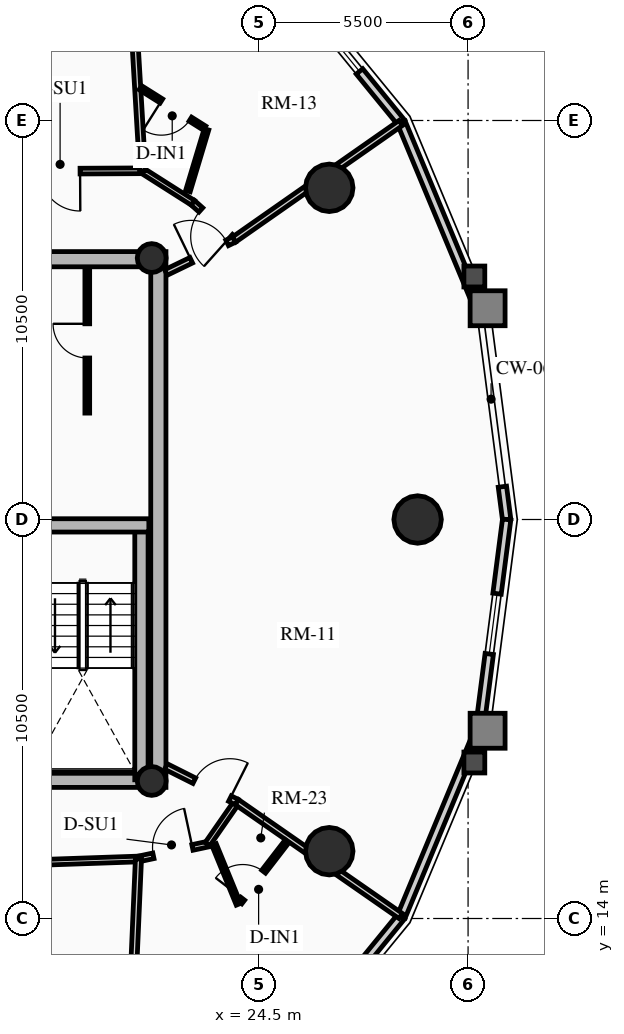
"""IFC4 building model, lengths in metres.
Left out: names, types, materials, properties, quantities, classifications, styles, units other than length and angle.
Written with IfcOpenShell. Run it as: python <this file> out.ifc"""

import sys

from ifc_helpers import new_model, si_unit, direction, frame, frame_2d, origin, origin_2d, place, context, subcontext, project, spatial, rectangle, circle, hollow_circle, extrude, source, transform, mapped, element, fill, save


model = new_model("IFC4")
c1 = context("Model", 3, precision=1e-05, world=origin(), true_north=direction((0.0, 1.0)))
c2 = subcontext(c1, "Body", "Model", "MODEL_VIEW")
j1 = project(units=[si_unit("LENGTHUNIT", "METRE"), si_unit("PLANEANGLEUNIT", "RADIAN")], contexts=[c1])
p1 = place(None, origin())
s1 = spatial("IfcSite", under=j1, at=p1, CompositionType="ELEMENT")
p2 = place(p1, origin())
s2 = spatial("IfcBuilding", under=s1, at=p2, CompositionType="ELEMENT")
p3 = place(p2, frame((0.0, 0.0, 151.6)))
s3 = spatial("IfcBuildingStorey", under=s2, at=p3, CompositionType="ELEMENT", Elevation=151.6)
p4 = place(p3, frame((21.85, 17.45, 0.0), z_axis=(0.0, 0.0, 1.0), x_axis=(0.0, 1.0, 0.0)))
e1 = element("IfcWall", 1, at=p4, inside=s3, PredefinedType="SHEAR", context=c2, shape_type="SweptSolid", body=[
    extrude(rectangle(XDim=14.1, YDim=0.4, at=frame_2d((7.05, 0.0))), origin(), (0.0, 0.0, 1.0), 2.91),
])
p5 = place(p3, frame((11.15, 17.65, 0.0), z_axis=(0.0, 0.0, 1.0), x_axis=(1.0, 0.0, 0.0)))
e2 = element("IfcWall", 2, at=p5, inside=s3, PredefinedType="SHEAR", context=c2, shape_type="SweptSolid", body=[
    extrude(rectangle(XDim=10.7, YDim=0.4, at=frame_2d((5.35, 0.0))), origin(), (0.0, 0.0, 1.0), 2.91),
])
m1 = source(origin(), c2, "Body", "SweptSolid", [
    extrude(rectangle(XDim=1.5, YDim=2.02, at=frame_2d((0.75, 1.01))), frame((0.0, 0.21, 0.0), z_axis=(0.0, -1.0, 0.0), x_axis=(1.0, 0.0, 0.0)), (0.0, 0.0, 1.0), 0.42),
])
p6 = place(p5, frame((5.45, 0.0, 0.0)))
e3 = element("IfcOpeningElement", 3, at=p6, cuts=e2, PredefinedType="OPENING", context=c2, shape_type="MappedRepresentation", body=[
    mapped(m1, transform((0.0, 0.0, 0.0), x_axis=(1.0, 0.0, 0.0), y_axis=(0.0, 1.0, 0.0), z_axis=(0.0, 0.0, 1.0), scale=1.0)),
])
p7 = place(p3, frame((11.15, 31.35, 0.0), z_axis=(0.0, 0.0, 1.0), x_axis=(1.0, 0.0, 0.0)))
e4 = element("IfcWall", 4, at=p7, inside=s3, PredefinedType="SHEAR", context=c2, shape_type="SweptSolid", body=[
    extrude(rectangle(XDim=10.7, YDim=0.4, at=frame_2d((5.35, 0.0))), origin(), (0.0, 0.0, 1.0), 2.91),
])
p8 = place(p7, frame((4.6, 0.0, 0.0)))
e5 = element("IfcOpeningElement", 5, at=p8, cuts=e4, PredefinedType="OPENING", context=c2, shape_type="MappedRepresentation", body=[
    mapped(m1, transform((0.0, 0.0, 0.0), x_axis=(1.0, 0.0, 0.0), y_axis=(0.0, 1.0, 0.0), z_axis=(0.0, 0.0, 1.0), scale=1.0)),
])
p9 = place(p3, frame((21.405, 17.65, 0.0), z_axis=(0.0, 0.0, 1.0), x_axis=(0.0, 1.0, 0.0)))
e6 = element("IfcWall", 6, at=p9, inside=s3, PredefinedType="SHEAR", context=c2, shape_type="SweptSolid", body=[
    extrude(rectangle(XDim=6.695, YDim=0.35, at=frame_2d((3.348, 0.0))), origin(), (0.0, 0.0, 1.0), 2.91),
])
p10 = place(p3, frame((18.315, 24.345, 0.0), z_axis=(0.0, 0.0, 1.0), x_axis=(1.0, 0.0, 0.0)))
e7 = element("IfcWall", 7, at=p10, inside=s3, PredefinedType="SHEAR", context=c2, shape_type="SweptSolid", body=[
    extrude(rectangle(XDim=3.285, YDim=0.35, at=frame_2d((1.643, 0.0))), origin(), (0.0, 0.0, 1.0), 2.91),
])
for number, where, z_axis, x_axis in (
    (8, (21.675, 17.62, 0.0), (0.0, 0.0, 1.0), (1.0, 0.0, 0.0)),
    (9, (21.675, 31.38, 0.0), (0.0, 0.0, 1.0), (1.0, 0.0, 0.0)),
):
    element("IfcColumn", number, at=place(p3, frame(where, z_axis=z_axis, x_axis=x_axis)), inside=s3, PredefinedType="COLUMN", context=c2, shape_type="SweptSolid", body=[
        extrude(hollow_circle(Radius=0.38, WallThickness=0.032, at=origin_2d()), origin(), (0.0, 0.0, 1.0), 2.91),
    ])
for number, where, z_axis, x_axis in (
    (10, (28.672, 24.5, 0.0), (0.0, 0.0, 1.0), (1.0, 0.0, 0.0)),
    (11, (26.347, 33.229, 0.0), (0.0, 0.0, 1.0), (1.0, 0.0, 0.0)),
    (12, (26.347, 15.771, 0.0), (0.0, 0.0, 1.0), (1.0, 0.0, 0.0)),
):
    element("IfcColumn", number, at=place(p3, frame(where, z_axis=z_axis, x_axis=x_axis)), inside=s3, PredefinedType="USERDEFINED", context=c2, shape_type="SweptSolid", body=[
        extrude(circle(Radius=0.625, at=origin_2d()), origin(), (0.0, 0.0, 1.0), 2.91),
    ])
p11 = place(p3, frame((30.903, 25.363, 0.0), z_axis=(0.0, 0.0, 1.0), x_axis=(0.128247365719, -0.991742211054, 0.0)))
e13 = element("IfcWall", 13, at=p11, inside=s3, PredefinedType="SOLIDWALL", context=c2, shape_type="SweptSolid", body=[
    extrude(rectangle(XDim=0.87, YDim=0.22, at=frame_2d((0.435, 0.0))), origin(), (0.0, 0.0, 1.0), 2.675),
])
p12 = place(p3, frame((28.243, 34.945, 0.0), z_axis=(0.0, 0.0, 1.0), x_axis=(0.384259959969, -0.923224936386, 0.0)))
e14 = element("IfcWall", 14, at=p12, inside=s3, PredefinedType="SOLIDWALL", context=c2, shape_type="SweptSolid", body=[
    extrude(rectangle(XDim=5.365, YDim=0.22, at=frame_2d((2.683, 0.0))), origin(), (0.0, 0.0, 1.0), 2.245),
])
p13 = place(p3, frame((25.032, 38.876, 0.0), z_axis=(0.0, 0.0, 1.0), x_axis=(0.632598524901, -0.774479894053, 0.0)))
e15 = element("IfcWall", 15, at=p13, inside=s3, PredefinedType="SOLIDWALL", context=c2, shape_type="SweptSolid", body=[
    extrude(rectangle(XDim=5.076, YDim=0.22, at=frame_2d((2.538, 0.0))), origin(), (0.0, 0.0, 1.0), 2.245),
])
m2 = source(origin(), c2, "Body", "SweptSolid", [
    extrude(rectangle(XDim=1.6, YDim=1.3, at=frame_2d((0.8, 0.65))), frame((0.0, 0.12, 0.0), z_axis=(0.0, -1.0, 0.0), x_axis=(1.0, 0.0, 0.0)), (0.0, 0.0, 1.0), 0.24),
])
p14 = place(p13, frame((1.738, 0.0, 0.65)))
e16 = element("IfcOpeningElement", 16, at=p14, cuts=e15, PredefinedType="OPENING", context=c2, shape_type="MappedRepresentation", body=[
    mapped(m2, transform((0.0, 0.0, 0.0), x_axis=(1.0, 0.0, 0.0), y_axis=(0.0, 1.0, 0.0), z_axis=(0.0, 0.0, 1.0), scale=1.0)),
])
p15 = place(p3, frame((28.243, 14.055, 0.0), z_axis=(0.0, 0.0, 1.0), x_axis=(-0.632598524901, -0.774479894053, 0.0)))
e17 = element("IfcWall", 17, at=p15, inside=s3, PredefinedType="SOLIDWALL", context=c2, shape_type="SweptSolid", body=[
    extrude(rectangle(XDim=5.076, YDim=0.22, at=frame_2d((2.538, 0.0))), origin(), (0.0, 0.0, 1.0), 2.245),
])
p16 = place(p15, frame((1.738, 0.0, 0.65)))
e18 = element("IfcOpeningElement", 18, at=p16, cuts=e17, PredefinedType="OPENING", context=c2, shape_type="MappedRepresentation", body=[
    mapped(m2, transform((0.0, 0.0, 0.0), x_axis=(1.0, 0.0, 0.0), y_axis=(0.0, 1.0, 0.0), z_axis=(0.0, 0.0, 1.0), scale=1.0)),
])
p17 = place(p3, frame((30.305, 19.009, 0.0), z_axis=(0.0, 0.0, 1.0), x_axis=(-0.384259959969, -0.923224936386, 0.0)))
e19 = element("IfcWall", 19, at=p17, inside=s3, PredefinedType="SOLIDWALL", context=c2, shape_type="SweptSolid", body=[
    extrude(rectangle(XDim=5.365, YDim=0.22, at=frame_2d((2.683, 0.0))), origin(), (0.0, 0.0, 1.0), 2.245),
])
p18 = place(p3, frame((31.015, 24.5, 0.0), z_axis=(0.0, 0.0, 1.0), x_axis=(-0.128266533912, -0.991739732126, 0.0)))
e20 = element("IfcWall", 20, at=p18, inside=s3, PredefinedType="SOLIDWALL", context=c2, shape_type="SweptSolid", body=[
    extrude(rectangle(XDim=5.537, YDim=0.22, at=frame_2d((2.769, 0.0))), origin(), (0.0, 0.0, 1.0), 2.245),
])
p19 = place(p18, frame((1.968, 0.0, 0.65)))
e21 = element("IfcOpeningElement", 21, at=p19, cuts=e20, PredefinedType="OPENING", context=c2, shape_type="MappedRepresentation", body=[
    mapped(m2, transform((0.0, 0.0, 0.0), x_axis=(1.0, 0.0, 0.0), y_axis=(0.0, 1.0, 0.0), z_axis=(0.0, 0.0, 1.0), scale=1.0)),
])
p20 = place(p3, frame((19.98, 27.3, 0.0), z_axis=(0.0, 0.0, 1.0), x_axis=(0.0, 1.0, 0.0)))
e22 = element("IfcWall", 22, at=p20, inside=s3, PredefinedType="PARTITIONING", context=c2, shape_type="SweptSolid", body=[
    extrude(rectangle(XDim=3.82, YDim=0.125, at=frame_2d((1.91, 0.0))), origin(), (0.0, 0.0, 1.0), 2.675),
])
m3 = source(origin(), c2, "Body", "SweptSolid", [
    extrude(rectangle(XDim=0.9, YDim=2.005, at=frame_2d((0.45, 1.002))), frame((0.0, 0.073, 0.0), z_axis=(0.0, -1.0, 0.0), x_axis=(1.0, 0.0, 0.0)), (0.0, 0.0, 1.0), 0.145),
])
p21 = place(p20, frame((1.45, 0.0, 0.0)))
e23 = element("IfcOpeningElement", 23, at=p21, cuts=e22, PredefinedType="OPENING", context=c2, shape_type="MappedRepresentation", body=[
    mapped(m3, transform((0.0, 0.0, 0.0), x_axis=(1.0, 0.0, 0.0), y_axis=(0.0, 1.0, 0.0), z_axis=(0.0, 0.0, 1.0), scale=1.0)),
])
p22 = place(p3, frame((23.841, 31.866, 0.0), z_axis=(0.0, 0.0, 1.0), x_axis=(-0.74511843306, 0.666932171, 0.0)))
e24 = element("IfcWall", 24, at=p22, inside=s3, PredefinedType="PARTITIONING", context=c2, shape_type="SweptSolid", body=[
    extrude(rectangle(XDim=1.455, YDim=0.15, at=frame_2d((0.728, 0.0))), origin(), (0.0, 0.0, 1.0), 2.245),
])
m4 = source(origin(), c2, "Body", "SweptSolid", [
    extrude(rectangle(XDim=1.05, YDim=2.015, at=frame_2d((0.525, 1.007))), frame((0.0, 0.085, 0.0), z_axis=(0.0, -1.0, 0.0), x_axis=(1.0, 0.0, 0.0)), (0.0, 0.0, 1.0), 0.17),
])
p23 = place(p22, frame((0.12, 0.0, 0.0)))
e25 = element("IfcOpeningElement", 25, at=p23, cuts=e24, PredefinedType="OPENING", context=c2, shape_type="MappedRepresentation", body=[
    mapped(m4, transform((0.0, 0.0, 0.0), x_axis=(1.0, 0.0, 0.0), y_axis=(0.0, 1.0, 0.0), z_axis=(0.0, 0.0, 1.0), scale=1.0)),
])
p24 = place(p3, frame((22.756, 32.836, 0.0), z_axis=(0.0, 0.0, 1.0), x_axis=(-0.843828401801, 0.536613108593, 0.0)))
e26 = element("IfcWall", 26, at=p24, inside=s3, PredefinedType="PARTITIONING", context=c2, shape_type="SweptSolid", body=[
    extrude(rectangle(XDim=1.565, YDim=0.15, at=frame_2d((0.783, 0.0))), origin(), (0.0, 0.0, 1.0), 2.245),
])
p25 = place(p3, frame((21.435, 33.677, 0.0), z_axis=(0.0, 0.0, 1.0), x_axis=(-0.999986775557, -0.005142831114, 0.0)))
e27 = element("IfcWall", 27, at=p25, inside=s3, PredefinedType="PARTITIONING", context=c2, shape_type="SweptSolid", body=[
    extrude(rectangle(XDim=3.323, YDim=0.15, at=frame_2d((1.662, 0.0))), origin(), (0.0, 0.0, 1.0), 2.245),
])
p26 = place(p25, frame((1.645, 0.0, 0.0)))
e28 = element("IfcOpeningElement", 28, at=p26, cuts=e27, PredefinedType="OPENING", context=c2, shape_type="MappedRepresentation", body=[
    mapped(m4, transform((0.0, 0.0, 0.0), x_axis=(1.0, 0.0, 0.0), y_axis=(0.0, 1.0, 0.0), z_axis=(0.0, 0.0, 1.0), scale=1.0)),
])
p27 = place(p3, frame((14.813, 15.341, 0.0), z_axis=(0.0, 0.0, 1.0), x_axis=(0.999402077819, 0.034575813105, 0.0)))
e29 = element("IfcWall", 29, at=p27, inside=s3, PredefinedType="PARTITIONING", context=c2, shape_type="SweptSolid", body=[
    extrude(rectangle(XDim=6.517, YDim=0.15, at=frame_2d((3.259, 0.0))), origin(), (0.0, 0.0, 1.0), 2.245),
])
p28 = place(p27, frame((2.734, 0.0, 0.0)))
e30 = element("IfcOpeningElement", 30, at=p28, cuts=e29, PredefinedType="OPENING", context=c2, shape_type="MappedRepresentation", body=[
    mapped(m4, transform((0.0, 0.0, 0.0), x_axis=(1.0, 0.0, 0.0), y_axis=(0.0, 1.0, 0.0), z_axis=(0.0, 0.0, 1.0), scale=1.0)),
])
p29 = place(p3, frame((21.326, 15.566, 0.0), z_axis=(0.0, 0.0, 1.0), x_axis=(0.977908238308, 0.209034632176, 0.0)))
e31 = element("IfcWall", 31, at=p29, inside=s3, PredefinedType="PARTITIONING", context=c2, shape_type="SweptSolid", body=[
    extrude(rectangle(XDim=1.855, YDim=0.15, at=frame_2d((0.927, 0.0))), origin(), (0.0, 0.0, 1.0), 2.245),
])
p30 = place(p29, frame((0.402, 0.0, 0.0)))
e32 = element("IfcOpeningElement", 32, at=p30, cuts=e31, PredefinedType="OPENING", context=c2, shape_type="MappedRepresentation", body=[
    mapped(m4, transform((0.0, 0.0, 0.0), x_axis=(1.0, 0.0, 0.0), y_axis=(0.0, 1.0, 0.0), z_axis=(0.0, 0.0, 1.0), scale=1.0)),
])
p31 = place(p3, frame((23.14, 15.954, 0.0), z_axis=(0.0, 0.0, 1.0), x_axis=(0.570699895117, 0.821158711647, 0.0)))
e33 = element("IfcWall", 33, at=p31, inside=s3, PredefinedType="PARTITIONING", context=c2, shape_type="SweptSolid", body=[
    extrude(rectangle(XDim=1.354, YDim=0.15, at=frame_2d((0.677, 0.0))), origin(), (0.0, 0.0, 1.0), 2.245),
])
p32 = place(p3, frame((23.841, 31.866, 0.0), z_axis=(0.0, 0.0, 1.0), x_axis=(0.819514693563, 0.573058170724, 0.0)))
e34 = element("IfcWall", 34, at=p32, inside=s3, PredefinedType="PARTITIONING", context=c2, shape_type="SweptSolid", body=[
    extrude(rectangle(XDim=5.352, YDim=0.16, at=frame_2d((2.676, 0.0))), origin(), (0.0, 0.0, 1.0), 2.245),
])
p33 = place(p3, frame((21.435, 33.677, 0.0), z_axis=(0.0, 0.0, 1.0), x_axis=(-0.059087305226, 0.99825281886, 0.0)))
e35 = element("IfcWall", 35, at=p33, inside=s3, PredefinedType="PARTITIONING", context=c2, shape_type="SweptSolid", body=[
    extrude(rectangle(XDim=7.718, YDim=0.16, at=frame_2d((3.859, 0.0))), origin(), (0.0, 0.0, 1.0), 2.245),
])
p34 = place(p3, frame((21.326, 15.566, 0.0), z_axis=(0.0, 0.0, 1.0), x_axis=(-0.043642330618, -0.999047219594, 0.0)))
e36 = element("IfcWall", 36, at=p34, inside=s3, PredefinedType="PARTITIONING", context=c2, shape_type="SweptSolid", body=[
    extrude(rectangle(XDim=7.955, YDim=0.16, at=frame_2d((3.978, 0.0))), origin(), (0.0, 0.0, 1.0), 2.245),
])
p35 = place(p3, frame((23.913, 17.065, 0.0), z_axis=(0.0, 0.0, 1.0), x_axis=(0.821126775727, -0.570745843773, 0.0)))
e37 = element("IfcWall", 37, at=p35, inside=s3, PredefinedType="PARTITIONING", context=c2, shape_type="SweptSolid", body=[
    extrude(rectangle(XDim=5.254, YDim=0.16, at=frame_2d((2.627, 0.0))), origin(), (0.0, 0.0, 1.0), 2.245),
])
p36 = place(p3, frame((22.05, 31.0, 0.0), z_axis=(0.0, 0.0, 1.0), x_axis=(0.900241516545, 0.435390872537, 0.0)))
e38 = element("IfcWall", 38, at=p36, inside=s3, PredefinedType="PARTITIONING", context=c2, shape_type="SweptSolid", body=[
    extrude(rectangle(XDim=1.989, YDim=0.16, at=frame_2d((0.995, 0.0))), origin(), (0.0, 0.0, 1.0), 2.245),
])
m5 = source(origin(), c2, "Body", "SweptSolid", [
    extrude(rectangle(XDim=1.05, YDim=2.015, at=frame_2d((0.525, 1.007))), frame((0.0, 0.09, 0.0), z_axis=(0.0, -1.0, 0.0), x_axis=(1.0, 0.0, 0.0)), (0.0, 0.0, 1.0), 0.18),
])
p37 = place(p36, frame((0.739, 0.0, 0.0)))
e39 = element("IfcOpeningElement", 39, at=p37, cuts=e38, PredefinedType="OPENING", context=c2, shape_type="MappedRepresentation", body=[
    mapped(m5, transform((0.0, 0.0, 0.0), x_axis=(1.0, 0.0, 0.0), y_axis=(0.0, 1.0, 0.0), z_axis=(0.0, 0.0, 1.0), scale=1.0)),
])
p38 = place(p3, frame((22.05, 18.0, 0.0), z_axis=(0.0, 0.0, 1.0), x_axis=(0.893817206679, -0.448431489799, 0.0)))
e40 = element("IfcWall", 40, at=p38, inside=s3, PredefinedType="PARTITIONING", context=c2, shape_type="SweptSolid", body=[
    extrude(rectangle(XDim=2.084, YDim=0.16, at=frame_2d((1.042, 0.0))), origin(), (0.0, 0.0, 1.0), 2.245),
])
p39 = place(p38, frame((0.834, 0.0, 0.0)))
e41 = element("IfcOpeningElement", 41, at=p39, cuts=e40, PredefinedType="OPENING", context=c2, shape_type="MappedRepresentation", body=[
    mapped(m5, transform((0.0, 0.0, 0.0), x_axis=(1.0, 0.0, 0.0), y_axis=(0.0, 1.0, 0.0), z_axis=(0.0, 0.0, 1.0), scale=1.0)),
])
p40 = place(p3, frame((22.628, 33.142, 0.0), z_axis=(0.0, 0.0, 1.0), x_axis=(0.28808673097, 0.957604320917, 0.0)))
e42 = element("IfcWall", 42, at=p40, inside=s3, PredefinedType="PARTITIONING", context=c2, shape_type="SweptSolid", body=[
    extrude(rectangle(XDim=1.698, YDim=0.125, at=frame_2d((0.849, 0.0))), origin(), (0.0, 0.0, 1.0), 2.245),
])
p41 = place(p3, frame((23.064, 34.801, 0.0), z_axis=(0.0, 0.0, 1.0), x_axis=(-0.846418905871, 0.532517638942, 0.0)))
e43 = element("IfcWall", 43, at=p41, inside=s3, PredefinedType="PARTITIONING", context=c2, shape_type="SweptSolid", body=[
    extrude(rectangle(XDim=1.993, YDim=0.125, at=frame_2d((0.997, 0.0))), origin(), (0.0, 0.0, 1.0), 2.675),
])
p42 = place(p41, frame((0.44, 0.0, 0.0)))
e44 = element("IfcOpeningElement", 44, at=p42, cuts=e43, PredefinedType="OPENING", context=c2, shape_type="MappedRepresentation", body=[
    mapped(m3, transform((0.0, 0.0, 0.0), x_axis=(1.0, 0.0, 0.0), y_axis=(0.0, 1.0, 0.0), z_axis=(0.0, 0.0, 1.0), scale=1.0)),
])
p43 = place(p3, frame((23.315, 15.947, 0.0), z_axis=(0.0, 0.0, 1.0), x_axis=(0.37920929394, -0.925310926873, 0.0)))
e45 = element("IfcWall", 45, at=p43, inside=s3, PredefinedType="PARTITIONING", context=c2, shape_type="SweptSolid", body=[
    extrude(rectangle(XDim=1.698, YDim=0.125, at=frame_2d((0.849, 0.0))), origin(), (0.0, 0.0, 1.0), 2.675),
])
p44 = place(p3, frame((23.998, 14.425, 0.0), z_axis=(0.0, 0.0, 1.0), x_axis=(0.610534539262, 0.791989631478, 0.0)))
e46 = element("IfcWall", 46, at=p44, inside=s3, PredefinedType="PARTITIONING", context=c2, shape_type="SweptSolid", body=[
    extrude(rectangle(XDim=2.033, YDim=0.125, at=frame_2d((1.017, 0.0))), origin(), (0.0, 0.0, 1.0), 2.675),
])
p45 = place(p44, frame((0.12, 0.0, 0.0)))
e47 = element("IfcOpeningElement", 47, at=p45, cuts=e46, PredefinedType="OPENING", context=c2, shape_type="MappedRepresentation", body=[
    mapped(m3, transform((0.0, 0.0, 0.0), x_axis=(1.0, 0.0, 0.0), y_axis=(0.0, 1.0, 0.0), z_axis=(0.0, 0.0, 1.0), scale=1.0)),
])
m6 = source(origin(), c2, "Body", "SweptSolid", [
    extrude(rectangle(XDim=1.6, YDim=1.3, at=frame_2d((0.8, 0.65))), frame((0.0, 0.03, 0.0), z_axis=(0.0, -1.0, 0.0), x_axis=(1.0, 0.0, 0.0)), (0.0, 0.0, 1.0), 0.06),
])
p46 = place(p14, origin())
e48 = element("IfcWindow", 48, at=p46, inside=s3, PartitioningType="SINGLE_PANEL", PredefinedType="WINDOW", context=c2, shape_type="MappedRepresentation", body=[
    mapped(m6, transform((0.0, 0.0, 0.0), x_axis=(1.0, 0.0, 0.0), y_axis=(0.0, 1.0, 0.0), z_axis=(0.0, 0.0, 1.0), scale=1.0)),
])
fill(e16, e48)
p47 = place(p19, origin())
e49 = element("IfcWindow", 49, at=p47, inside=s3, PartitioningType="SINGLE_PANEL", PredefinedType="WINDOW", context=c2, shape_type="MappedRepresentation", body=[
    mapped(m6, transform((0.0, 0.0, 0.0), x_axis=(1.0, 0.0, 0.0), y_axis=(0.0, 1.0, 0.0), z_axis=(0.0, 0.0, 1.0), scale=1.0)),
])
fill(e21, e49)
m7 = source(origin(), c2, "Body", "SweptSolid", [
    extrude(rectangle(XDim=0.9, YDim=2.005, at=frame_2d((0.45, 1.002))), frame((0.0, 0.025, 0.0), z_axis=(0.0, -1.0, 0.0), x_axis=(1.0, 0.0, 0.0)), (0.0, 0.0, 1.0), 0.05),
])
p48 = place(p21, origin())
e50 = element("IfcDoor", 50, at=p48, inside=s3, OperationType="SINGLE_SWING_RIGHT", PredefinedType="DOOR", context=c2, shape_type="MappedRepresentation", body=[
    mapped(m7, transform((0.0, 0.0, 0.0), x_axis=(1.0, 0.0, 0.0), y_axis=(0.0, 1.0, 0.0), z_axis=(0.0, 0.0, 1.0), scale=1.0)),
])
fill(e23, e50)
m8 = source(origin(), c2, "Body", "SweptSolid", [
    extrude(rectangle(XDim=1.05, YDim=2.015, at=frame_2d((0.525, 1.007))), frame((0.0, 0.025, 0.0), z_axis=(0.0, -1.0, 0.0), x_axis=(1.0, 0.0, 0.0)), (0.0, 0.0, 1.0), 0.05),
])
p49 = place(p37, origin())
e51 = element("IfcDoor", 51, at=p49, inside=s3, OperationType="SINGLE_SWING_LEFT", PredefinedType="DOOR", context=c2, shape_type="MappedRepresentation", body=[
    mapped(m8, transform((0.0, 0.0, 0.0), x_axis=(1.0, 0.0, 0.0), y_axis=(0.0, 1.0, 0.0), z_axis=(0.0, 0.0, 1.0), scale=1.0)),
])
fill(e39, e51)
p50 = place(p39, origin())
e52 = element("IfcDoor", 52, at=p50, inside=s3, OperationType="SINGLE_SWING_RIGHT", PredefinedType="DOOR", context=c2, shape_type="MappedRepresentation", body=[
    mapped(m8, transform((0.0, 0.0, 0.0), x_axis=(1.0, 0.0, 0.0), y_axis=(0.0, 1.0, 0.0), z_axis=(0.0, 0.0, 1.0), scale=1.0)),
])
fill(e41, e52)
p51 = place(p23, origin())
e53 = element("IfcDoor", 53, at=p51, inside=s3, OperationType="SINGLE_SWING_LEFT", PredefinedType="DOOR", context=c2, shape_type="MappedRepresentation", body=[
    mapped(m8, transform((0.0, 0.0, 0.0), x_axis=(1.0, 0.0, 0.0), y_axis=(0.0, 1.0, 0.0), z_axis=(0.0, 0.0, 1.0), scale=1.0)),
])
fill(e25, e53)
p52 = place(p42, origin())
e54 = element("IfcDoor", 54, at=p52, inside=s3, OperationType="SINGLE_SWING_RIGHT", PredefinedType="DOOR", context=c2, shape_type="MappedRepresentation", body=[
    mapped(m7, transform((0.0, 0.0, 0.0), x_axis=(1.0, 0.0, 0.0), y_axis=(0.0, 1.0, 0.0), z_axis=(0.0, 0.0, 1.0), scale=1.0)),
])
fill(e44, e54)
p53 = place(p26, origin())
e55 = element("IfcDoor", 55, at=p53, inside=s3, OperationType="SINGLE_SWING_LEFT", PredefinedType="DOOR", context=c2, shape_type="MappedRepresentation", body=[
    mapped(m8, transform((0.0, 0.0, 0.0), x_axis=(1.0, 0.0, 0.0), y_axis=(0.0, 1.0, 0.0), z_axis=(0.0, 0.0, 1.0), scale=1.0)),
])
fill(e28, e55)
p54 = place(p30, origin())
e56 = element("IfcDoor", 56, at=p54, inside=s3, OperationType="SINGLE_SWING_RIGHT", PredefinedType="DOOR", context=c2, shape_type="MappedRepresentation", body=[
    mapped(m8, transform((0.0, 0.0, 0.0), x_axis=(1.0, 0.0, 0.0), y_axis=(0.0, 1.0, 0.0), z_axis=(0.0, 0.0, 1.0), scale=1.0)),
])
fill(e32, e56)
p55 = place(p45, origin())
e57 = element("IfcDoor", 57, at=p55, inside=s3, OperationType="SINGLE_SWING_LEFT", PredefinedType="DOOR", context=c2, shape_type="MappedRepresentation", body=[
    mapped(m7, transform((0.0, 0.0, 0.0), x_axis=(1.0, 0.0, 0.0), y_axis=(0.0, 1.0, 0.0), z_axis=(0.0, 0.0, 1.0), scale=1.0)),
])
fill(e47, e57)
save(model, sys.argv[1])
